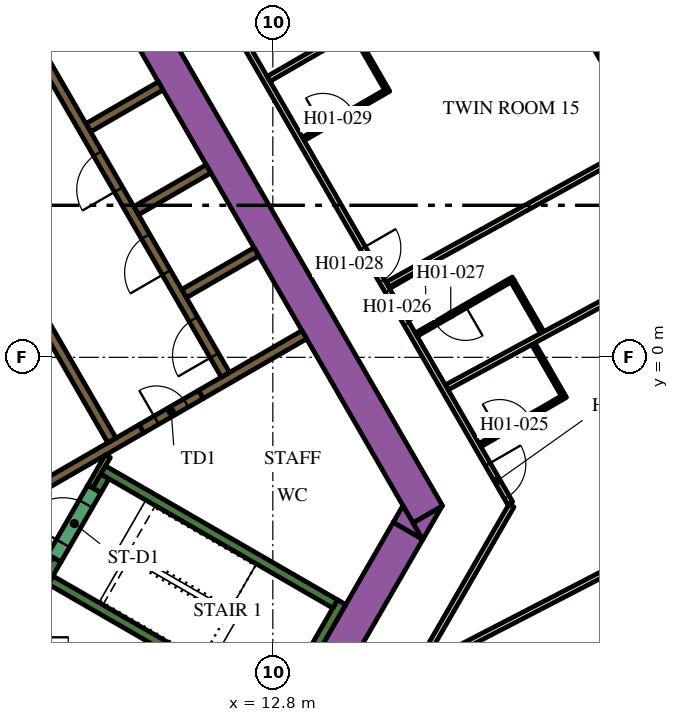
"""IFC4 building model, lengths in metres.
Left out: names, types, materials, properties, quantities, classifications, styles, units other than length and angle.
Written with IfcOpenShell. Run it as: python <this file> out.ifc"""

import sys

from ifc_helpers import new_model, si_unit, direction, frame, frame_2d, origin, origin_2d, place, context, subcontext, project, spatial, polyline, rectangle, outline, extrude, element, fill, save


model = new_model("IFC4")
c1 = context("Model", 3, precision=1e-05, world=origin(), true_north=direction((0.0, 1.0)))
c2 = subcontext(c1, "Body", "Model", "MODEL_VIEW")
j1 = project(units=[si_unit("LENGTHUNIT", "METRE"), si_unit("PLANEANGLEUNIT", "RADIAN")], contexts=[c1])
p1 = place(None, origin())
s1 = spatial("IfcSite", under=j1, at=p1, CompositionType="ELEMENT")
p2 = place(p1, origin())
s2 = spatial("IfcBuilding", under=s1, at=p2, CompositionType="ELEMENT")
p3 = place(p2, frame((0.0, 0.0, 35.4)))
s3 = spatial("IfcBuildingStorey", under=s2, at=p3, CompositionType="ELEMENT", Elevation=35.4)
p4 = place(p3, frame((21.443, 8.685, 0.0), z_axis=(0.0, 0.0, 1.0), x_axis=(-0.491973853463, 0.870609974391, 0.0)))
e1 = element("IfcColumn", 1, at=p4, inside=s3, PredefinedType="COLUMN", context=c2, shape_type="SweptSolid", body=[
    extrude(rectangle(XDim=1.4, YDim=0.9, at=origin_2d()), origin(), (0.0, 0.0, 1.0), 3.9),
])
p5 = place(p3, frame((6.711, 13.476, 0.0), z_axis=(0.0, 0.0, 1.0), x_axis=(0.500002723396, -0.866023831425, 0.0)))
e2 = element("IfcWall", 2, at=p5, inside=s3, PredefinedType="SOLIDWALL", context=c2, shape_type="SweptSolid", body=[
    extrude(rectangle(XDim=20.334, YDim=0.9, at=frame_2d((10.167, 0.0))), origin(), (0.0, 0.0, 1.0), 3.9),
])
p6 = place(p3, origin())
e3 = element("IfcWall", 3, at=p6, inside=s3, PredefinedType="SOLIDWALL", context=c2, shape_type="SweptSolid", body=[
    extrude(outline(polyline([(16.743, -4.8), (16.489, -4.36), (17.251, -3.92), (16.743, -4.8)])), origin(), (0.0, 0.0, 1.0), 3.9),
])
p7 = place(p3, frame((11.695, -12.644, 0.0), z_axis=(0.0, 0.0, 1.0), x_axis=(0.500010229568, 0.86601949766, 0.0)))
e4 = element("IfcWall", 4, at=p7, inside=s3, PredefinedType="SOLIDWALL", context=c2, shape_type="SweptSolid", body=[
    extrude(rectangle(XDim=9.326, YDim=0.9, at=frame_2d((4.663, 0.0))), origin(), (0.0, 0.0, 1.0), 3.9),
])
e5 = element("IfcWall", 5, at=p6, inside=s3, PredefinedType="SOLIDWALL", context=c2, shape_type="SweptSolid", body=[
    extrude(outline(polyline([(16.223, -3.9), (16.732, -4.78), (15.969, -4.34), (16.223, -3.9)])), origin(), (0.0, 0.0, 1.0), 3.9),
])
p8 = place(p3, frame((12.885, -9.431, 0.0), z_axis=(0.0, 0.0, 1.0), x_axis=(0.500020560727, 0.866013532718, 0.0)))
e6 = element("IfcWall", 6, at=p8, inside=s3, PredefinedType="SOLIDWALL", context=c2, shape_type="SweptSolid", body=[
    extrude(rectangle(XDim=3.45, YDim=0.25, at=frame_2d((1.725, 0.0))), origin(), (0.0, 0.0, 1.0), 3.9),
])
p9 = place(p3, frame((12.84, -9.261, 0.0), z_axis=(0.0, 0.0, 1.0), x_axis=(-0.866013990052, 0.500019768644, 0.0)))
e7 = element("IfcWall", 7, at=p9, inside=s3, PredefinedType="SOLIDWALL", context=c2, shape_type="SweptSolid", body=[
    extrude(rectangle(XDim=6.8, YDim=0.25, at=frame_2d((3.4, 0.0))), origin(), (0.0, 0.0, 1.0), 3.9),
])
p10 = place(p3, frame((6.78, -5.906, 0.0), z_axis=(0.0, 0.0, 1.0), x_axis=(0.500223362819, 0.865896406789, 0.0)))
e8 = element("IfcWall", 8, at=p10, inside=s3, PredefinedType="SOLIDWALL", context=c2, shape_type="SweptSolid", body=[
    extrude(rectangle(XDim=0.675, YDim=0.25, at=frame_2d((0.337, 0.0))), origin(), (0.0, 0.0, 1.0), 3.9),
])
p11 = place(p3, frame((8.334, -2.964, 0.0), z_axis=(0.0, 0.0, 1.0), x_axis=(0.866016039709, -0.500016218704, 0.0)))
e9 = element("IfcWall", 9, at=p11, inside=s3, PredefinedType="SOLIDWALL", context=c2, shape_type="SweptSolid", body=[
    extrude(rectangle(XDim=7.05, YDim=0.25, at=frame_2d((3.525, 0.0))), origin(), (0.0, 0.0, 1.0), 3.9),
])
p12 = place(p3, frame((8.168, -3.503, 0.0), z_axis=(0.0, 0.0, 1.0), x_axis=(0.49972245349, 0.866185586049, 0.0)))
e10 = element("IfcWall", 10, at=p12, inside=s3, PredefinedType="SOLIDWALL", context=c2, shape_type="SweptSolid", body=[
    extrude(rectangle(XDim=0.425, YDim=0.25, at=frame_2d((0.212, 0.0))), origin(), (0.0, 0.0, 1.0), 3.9),
])
p13 = place(p3, frame((10.464, 1.677, 0.0), z_axis=(0.0, 0.0, 1.0), x_axis=(0.86605622881, 0.499946605688, 0.0)))
e11 = element("IfcWall", 11, at=p13, inside=s3, PredefinedType="SOLIDWALL", context=c2, shape_type="SweptSolid", body=[
    extrude(rectangle(XDim=2.2, YDim=0.25, at=frame_2d((1.1, 0.0))), origin(), (0.0, 0.0, 1.0), 3.9),
])
p14 = place(p3, frame((13.629, 0.594, 0.0), z_axis=(0.0, 0.0, 1.0), x_axis=(-0.86602790099, -0.499995674689, 0.0)))
e12 = element("IfcWall", 12, at=p14, inside=s3, PredefinedType="SOLIDWALL", context=c2, shape_type="SweptSolid", body=[
    extrude(rectangle(XDim=3.146, YDim=0.25, at=frame_2d((1.573, 0.0))), origin(), (0.0, 0.0, 1.0), 3.9),
])
p15 = place(p3, frame((6.614, -3.456, 0.0), z_axis=(0.0, 0.0, 1.0), x_axis=(0.86602447079, 0.500001615989, 0.0)))
e13 = element("IfcWall", 13, at=p15, inside=s3, PredefinedType="SOLIDWALL", context=c2, shape_type="SweptSolid", body=[
    extrude(rectangle(XDim=3.154, YDim=0.25, at=frame_2d((1.577, 0.0))), origin(), (0.0, 0.0, 1.0), 3.9),
])
for number, where, z_axis, x_axis in (
    (14, (7.944, 6.041, 0.0), (0.0, 0.0, 1.0), (0.866, 0.5, 0.0)),
    (15, (9.204, 3.859, 0.0), (0.0, 0.0, 1.0), (0.866, 0.5, 0.0)),
):
    element("IfcWall", number, at=place(p3, frame(where, z_axis=z_axis, x_axis=x_axis)), inside=s3, PredefinedType="SOLIDWALL", context=c2, shape_type="SweptSolid", body=[
        extrude(rectangle(XDim=2.2, YDim=0.25, at=frame_2d((1.1, 0.0))), origin(), (0.0, 0.0, 1.0), 3.9),
    ])
p16 = place(p3, frame((6.945, -5.222, 0.0), z_axis=(0.0, 0.0, 1.0), x_axis=(-0.499818422106, -0.866130212453, 0.0)))
e16 = element("IfcWall", 16, at=p16, inside=s3, PredefinedType="PARTITIONING", context=c2, shape_type="SweptSolid", body=[
    extrude(rectangle(XDim=0.514, YDim=0.15, at=frame_2d((0.257, 0.0))), origin(), (0.0, 0.0, 1.0), 2.75),
])
p17 = place(p3, frame((8.459, -2.599, 0.0), z_axis=(0.0, 0.0, 1.0), x_axis=(-0.500041054325, -0.866001699761, 0.0)))
e17 = element("IfcWall", 17, at=p17, inside=s3, PredefinedType="PARTITIONING", context=c2, shape_type="SweptSolid", body=[
    extrude(rectangle(XDim=0.929, YDim=0.15, at=frame_2d((0.464, 0.0))), origin(), (0.0, 0.0, 1.0), 3.9),
])
p18 = place(p3, frame((11.553, -0.46, 0.0), z_axis=(0.0, 0.0, 1.0), x_axis=(-0.500006514828, 0.866021642414, 0.0)))
e18 = element("IfcWall", 18, at=p18, inside=s3, PredefinedType="SOLIDWALL", context=c2, shape_type="SweptSolid", body=[
    extrude(rectangle(XDim=12.35, YDim=0.25, at=frame_2d((6.175, 0.0))), origin(), (0.0, 0.0, 1.0), 3.9),
])
p19 = place(p18, frame((0.585, 0.0, 0.0)))
e19 = element("IfcOpeningElement", 19, at=p19, cuts=e18, PredefinedType="OPENING", context=c2, shape_type="SweptSolid", body=[
    extrude(rectangle(XDim=1.1, YDim=2.1, at=frame_2d((0.55, 1.05))), frame((0.0, 0.135, 0.0), z_axis=(0.0, -1.0, 0.0), x_axis=(1.0, 0.0, 0.0)), (0.0, 0.0, 1.0), 0.27),
])
p20 = place(p18, frame((3.105, 0.0, 0.0)))
e20 = element("IfcOpeningElement", 20, at=p20, cuts=e18, PredefinedType="OPENING", context=c2, shape_type="SweptSolid", body=[
    extrude(rectangle(XDim=1.1, YDim=2.1, at=frame_2d((0.55, 1.05))), frame((0.0, 0.135, 0.0), z_axis=(0.0, -1.0, 0.0), x_axis=(1.0, 0.0, 0.0)), (0.0, 0.0, 1.0), 0.27),
])
p21 = place(p18, frame((5.625, 0.0, 0.0)))
e21 = element("IfcOpeningElement", 21, at=p21, cuts=e18, PredefinedType="OPENING", context=c2, shape_type="SweptSolid", body=[
    extrude(rectangle(XDim=1.1, YDim=2.1, at=frame_2d((0.55, 1.05))), frame((0.0, 0.135, 0.0), z_axis=(0.0, -1.0, 0.0), x_axis=(1.0, 0.0, 0.0)), (0.0, 0.0, 1.0), 0.27),
])
p22 = place(p3, frame((8.565, -2.185, 0.0), z_axis=(0.0, 0.0, 1.0), x_axis=(-0.499997954832, 0.866026584559, 0.0)))
e22 = element("IfcWall", 22, at=p22, inside=s3, PredefinedType="SOLIDWALL", context=c2, shape_type="SweptSolid", body=[
    extrude(rectangle(XDim=12.35, YDim=0.25, at=frame_2d((6.175, 0.0))), origin(), (0.0, 0.0, 1.0), 3.9),
])
p23 = place(p22, frame((5.725, 0.0, 0.0)))
e23 = element("IfcOpeningElement", 23, at=p23, cuts=e22, PredefinedType="OPENING", context=c2, shape_type="SweptSolid", body=[
    extrude(rectangle(XDim=0.9, YDim=2.1, at=frame_2d((0.45, 1.05))), frame((0.0, 0.135, 0.0), z_axis=(0.0, -1.0, 0.0), x_axis=(1.0, 0.0, 0.0)), (0.0, 0.0, 1.0), 0.27),
])
p24 = place(p3, frame((7.053, -5.284, 0.0), z_axis=(0.0, 0.0, 1.0), x_axis=(0.500078061341, 0.865980330357, 0.0)))
e24 = element("IfcWall", 24, at=p24, inside=s3, PredefinedType="SOLIDWALL", context=c2, shape_type="SweptSolid", body=[
    extrude(rectangle(XDim=2.1, YDim=0.4, at=frame_2d((1.05, 0.0))), origin(), (0.0, 0.0, 1.0), 3.9),
])
p25 = place(p24, frame((0.45, 0.0, 0.0)))
e25 = element("IfcOpeningElement", 25, at=p25, cuts=e24, PredefinedType="OPENING", context=c2, shape_type="SweptSolid", body=[
    extrude(rectangle(XDim=1.2, YDim=2.1, at=frame_2d((0.6, 1.05))), frame((0.0, 0.21, 0.0), z_axis=(0.0, -1.0, 0.0), x_axis=(1.0, 0.0, 0.0)), (0.0, 0.0, 1.0), 0.42),
])
p26 = place(p3, frame((9.346, -1.879, 0.0), z_axis=(0.0, 0.0, 1.0), x_axis=(0.866047807691, 0.499961193289, 0.0)))
e26 = element("IfcWall", 26, at=p26, inside=s3, PredefinedType="SOLIDWALL", context=c2, shape_type="SweptSolid", body=[
    extrude(rectangle(XDim=1.8, YDim=0.25, at=frame_2d((0.9, 0.0))), origin(), (0.0, 0.0, 1.0), 3.9),
])
p27 = place(p26, frame((0.45, 0.0, 0.0)))
e27 = element("IfcOpeningElement", 27, at=p27, cuts=e26, PredefinedType="OPENING", context=c2, shape_type="SweptSolid", body=[
    extrude(rectangle(XDim=0.9, YDim=2.1, at=frame_2d((0.45, 1.05))), frame((0.0, 0.135, 0.0), z_axis=(0.0, -1.0, 0.0), x_axis=(1.0, 0.0, 0.0)), (0.0, 0.0, 1.0), 0.27),
])
p28 = place(p3, frame((19.081, -3.9, 0.0), z_axis=(0.0, 0.0, 1.0), x_axis=(-0.499974327079, -0.866040225545, 0.0)))
e28 = element("IfcWall", 28, at=p28, inside=s3, PredefinedType="PARTITIONING", context=c2, shape_type="SweptSolid", body=[
    extrude(rectangle(XDim=5.258, YDim=0.15, at=frame_2d((2.629, 0.0))), origin(), (0.0, 0.0, 1.0), 2.75),
])
p29 = place(p3, frame((6.163, 18.475, 0.0), z_axis=(0.0, 0.0, 1.0), x_axis=(0.500001317485, -0.866024643133, 0.0)))
e29 = element("IfcWall", 29, at=p29, inside=s3, PredefinedType="PARTITIONING", context=c2, shape_type="SweptSolid", body=[
    extrude(rectangle(XDim=25.767, YDim=0.15, at=frame_2d((12.883, 0.0))), origin(), (0.0, 0.0, 1.0), 2.75),
])
p30 = place(p29, frame((24.586, 0.0, 0.0)))
e30 = element("IfcOpeningElement", 30, at=p30, cuts=e29, PredefinedType="OPENING", context=c2, shape_type="SweptSolid", body=[
    extrude(rectangle(XDim=1.0, YDim=2.1, at=frame_2d((0.5, 1.05))), frame((0.0, 0.085, 0.0), z_axis=(0.0, -1.0, 0.0), x_axis=(1.0, 0.0, 0.0)), (0.0, 0.0, 1.0), 0.17),
])
p31 = place(p29, frame((19.319, 0.0, 0.0)))
e31 = element("IfcOpeningElement", 31, at=p31, cuts=e29, PredefinedType="OPENING", context=c2, shape_type="SweptSolid", body=[
    extrude(rectangle(XDim=1.0, YDim=2.1, at=frame_2d((0.5, 1.05))), frame((0.0, 0.085, 0.0), z_axis=(0.0, -1.0, 0.0), x_axis=(1.0, 0.0, 0.0)), (0.0, 0.0, 1.0), 0.17),
])
p32 = place(p29, frame((18.012, 0.0, 0.0)))
e32 = element("IfcOpeningElement", 32, at=p32, cuts=e29, PredefinedType="OPENING", context=c2, shape_type="SweptSolid", body=[
    extrude(rectangle(XDim=1.0, YDim=2.1, at=frame_2d((0.5, 1.05))), frame((0.0, 0.085, 0.0), z_axis=(0.0, -1.0, 0.0), x_axis=(1.0, 0.0, 0.0)), (0.0, 0.0, 1.0), 0.17),
])
p33 = place(p29, frame((6.824, 0.0, 0.0)))
e33 = element("IfcOpeningElement", 33, at=p33, cuts=e29, PredefinedType="OPENING", context=c2, shape_type="SweptSolid", body=[
    extrude(rectangle(XDim=1.1, YDim=2.1, at=frame_2d((0.55, 1.05))), frame((0.0, 0.085, 0.0), z_axis=(0.0, -1.0, 0.0), x_axis=(1.0, 0.0, 0.0)), (0.0, 0.0, 1.0), 0.17),
])
p34 = place(p29, frame((4.658, 0.0, 0.0)))
e34 = element("IfcOpeningElement", 34, at=p34, cuts=e29, PredefinedType="OPENING", context=c2, shape_type="SweptSolid", body=[
    extrude(rectangle(XDim=0.9, YDim=2.1, at=frame_2d((0.45, 1.05))), frame((0.0, 0.085, 0.0), z_axis=(0.0, -1.0, 0.0), x_axis=(1.0, 0.0, 0.0)), (0.0, 0.0, 1.0), 0.17),
])
p35 = place(p29, frame((0.18, 0.0, 0.0)))
e35 = element("IfcOpeningElement", 35, at=p35, cuts=e29, PredefinedType="OPENING", context=c2, shape_type="SweptSolid", body=[
    extrude(rectangle(XDim=1.0, YDim=2.1, at=frame_2d((0.5, 1.05))), frame((0.0, 0.085, 0.0), z_axis=(0.0, -1.0, 0.0), x_axis=(1.0, 0.0, 0.0)), (0.0, 0.0, 1.0), 0.17),
])
p36 = place(p3, frame((19.982, 11.537, 0.0), z_axis=(0.0, 0.0, 1.0), x_axis=(-0.866020994654, -0.500007636761, 0.0)))
e36 = element("IfcWall", 36, at=p36, inside=s3, PredefinedType="PARTITIONING", context=c2, shape_type="SweptSolid", body=[
    extrude(rectangle(XDim=8.423, YDim=0.15, at=frame_2d((4.211, 0.0))), origin(), (0.0, 0.0, 1.0), 2.75),
])
p37 = place(p3, frame((23.132, 5.962, 0.0), z_axis=(0.0, 0.0, 1.0), x_axis=(-0.875121716713, -0.483902863121, 0.0)))
e37 = element("IfcWall", 37, at=p37, inside=s3, PredefinedType="PARTITIONING", context=c2, shape_type="SweptSolid", body=[
    extrude(rectangle(XDim=8.355, YDim=0.15, at=frame_2d((4.178, 0.0))), origin(), (0.0, 0.0, 1.0), 2.75),
])
p38 = place(p3, frame((27.134, -2.779, 0.0), z_axis=(0.0, 0.0, 1.0), x_axis=(-0.8882049501, -0.459447457951, 0.0)))
e38 = element("IfcWall", 38, at=p38, inside=s3, PredefinedType="PARTITIONING", context=c2, shape_type="SweptSolid", body=[
    extrude(rectangle(XDim=11.638, YDim=0.15, at=frame_2d((5.819, 0.0))), origin(), (0.0, 0.0, 1.0), 2.75),
])
p39 = place(p3, frame((24.145, 2.871, 0.0), z_axis=(0.0, 0.0, 1.0), x_axis=(-0.879551725039, -0.475803281809, 0.0)))
e39 = element("IfcWall", 39, at=p39, inside=s3, PredefinedType="PARTITIONING", context=c2, shape_type="SweptSolid", body=[
    extrude(rectangle(XDim=7.688, YDim=0.15, at=frame_2d((3.844, 0.0))), origin(), (0.0, 0.0, 1.0), 2.75),
])
p40 = place(p3, frame((18.25, -2.311, 0.0), z_axis=(0.0, 0.0, 1.0), x_axis=(0.866021400173, 0.500006934395, 0.0)))
e40 = element("IfcWall", 40, at=p40, inside=s3, PredefinedType="PARTITIONING", context=c2, shape_type="SweptSolid", body=[
    extrude(rectangle(XDim=2.6, YDim=0.1, at=frame_2d((1.3, 0.0))), origin(), (0.0, 0.0, 1.0), 2.75),
])
p41 = place(p40, frame((0.6, 0.0, 0.0)))
e41 = element("IfcOpeningElement", 41, at=p41, cuts=e40, PredefinedType="OPENING", context=c2, shape_type="SweptSolid", body=[
    extrude(rectangle(XDim=0.9, YDim=2.1, at=frame_2d((0.45, 1.05))), frame((0.0, 0.06, 0.0), z_axis=(0.0, -1.0, 0.0), x_axis=(1.0, 0.0, 0.0)), (0.0, 0.0, 1.0), 0.12),
])
p42 = place(p3, frame((20.434, -0.993, 0.0), z_axis=(0.0, 0.0, 1.0), x_axis=(-0.500086022567, 0.865975732936, 0.0)))
e42 = element("IfcWall", 42, at=p42, inside=s3, PredefinedType="PARTITIONING", context=c2, shape_type="SweptSolid", body=[
    extrude(rectangle(XDim=1.55, YDim=0.1, at=frame_2d((0.775, 0.0))), origin(), (0.0, 0.0, 1.0), 2.75),
])
p43 = place(p3, frame((19.127, 2.071, 0.0), z_axis=(0.0, 0.0, 1.0), x_axis=(-0.866003658127, -0.500037662692, 0.0)))
e43 = element("IfcWall", 43, at=p43, inside=s3, PredefinedType="PARTITIONING", context=c2, shape_type="SweptSolid", body=[
    extrude(rectangle(XDim=2.95, YDim=0.1, at=frame_2d((1.475, 0.0))), origin(), (0.0, 0.0, 1.0), 2.75),
])
p44 = place(p43, frame((1.45, 0.0, 0.0)))
e44 = element("IfcOpeningElement", 44, at=p44, cuts=e43, PredefinedType="OPENING", context=c2, shape_type="SweptSolid", body=[
    extrude(rectangle(XDim=0.9, YDim=2.1, at=frame_2d((0.45, 1.05))), frame((0.0, 0.06, 0.0), z_axis=(0.0, -1.0, 0.0), x_axis=(1.0, 0.0, 0.0)), (0.0, 0.0, 1.0), 0.12),
])
p45 = place(p3, frame((19.109, 2.002, 0.0), z_axis=(0.0, 0.0, 1.0), x_axis=(0.500086022567, -0.865975732936, 0.0)))
e45 = element("IfcWall", 45, at=p45, inside=s3, PredefinedType="PARTITIONING", context=c2, shape_type="SweptSolid", body=[
    extrude(rectangle(XDim=1.55, YDim=0.1, at=frame_2d((0.775, 0.0))), origin(), (0.0, 0.0, 1.0), 2.75),
])
p46 = place(p3, frame((13.6, 5.744, 0.0), z_axis=(0.0, 0.0, 1.0), x_axis=(0.866021400173, 0.500006934395, 0.0)))
e46 = element("IfcWall", 46, at=p46, inside=s3, PredefinedType="PARTITIONING", context=c2, shape_type="SweptSolid", body=[
    extrude(rectangle(XDim=2.6, YDim=0.1, at=frame_2d((1.3, 0.0))), origin(), (0.0, 0.0, 1.0), 2.75),
])
p47 = place(p46, frame((0.6, 0.0, 0.0)))
e47 = element("IfcOpeningElement", 47, at=p47, cuts=e46, PredefinedType="OPENING", context=c2, shape_type="SweptSolid", body=[
    extrude(rectangle(XDim=0.9, YDim=2.1, at=frame_2d((0.45, 1.05))), frame((0.0, 0.06, 0.0), z_axis=(0.0, -1.0, 0.0), x_axis=(1.0, 0.0, 0.0)), (0.0, 0.0, 1.0), 0.12),
])
p48 = place(p3, frame((15.779, 7.071, 0.0), z_axis=(0.0, 0.0, 1.0), x_axis=(-0.499976720371, 0.866038843867, 0.0)))
e48 = element("IfcWall", 48, at=p48, inside=s3, PredefinedType="PARTITIONING", context=c2, shape_type="SweptSolid", body=[
    extrude(rectangle(XDim=1.69, YDim=0.1, at=frame_2d((0.845, 0.0))), origin(), (0.0, 0.0, 1.0), 2.75),
])
p49 = place(p19, origin())
e49 = element("IfcDoor", 49, at=p49, inside=s3, OperationType="DOUBLE_DOOR_SLIDING", PredefinedType="DOOR", context=c2, shape_type="SweptSolid", body=[
    extrude(rectangle(XDim=1.1, YDim=2.1, at=frame_2d((0.55, 1.05))), frame((0.0, 0.025, 0.0), z_axis=(0.0, -1.0, 0.0), x_axis=(1.0, 0.0, 0.0)), (0.0, 0.0, 1.0), 0.05),
])
fill(e19, e49)
p50 = place(p20, origin())
e50 = element("IfcDoor", 50, at=p50, inside=s3, OperationType="DOUBLE_DOOR_SLIDING", PredefinedType="DOOR", context=c2, shape_type="SweptSolid", body=[
    extrude(rectangle(XDim=1.1, YDim=2.1, at=frame_2d((0.55, 1.05))), frame((0.0, 0.025, 0.0), z_axis=(0.0, -1.0, 0.0), x_axis=(1.0, 0.0, 0.0)), (0.0, 0.0, 1.0), 0.05),
])
fill(e20, e50)
p51 = place(p21, origin())
e51 = element("IfcDoor", 51, at=p51, inside=s3, OperationType="DOUBLE_DOOR_SLIDING", PredefinedType="DOOR", context=c2, shape_type="SweptSolid", body=[
    extrude(rectangle(XDim=1.1, YDim=2.1, at=frame_2d((0.55, 1.05))), frame((0.0, 0.025, 0.0), z_axis=(0.0, -1.0, 0.0), x_axis=(1.0, 0.0, 0.0)), (0.0, 0.0, 1.0), 0.05),
])
fill(e21, e51)
p52 = place(p25, origin())
e52 = element("IfcDoor", 52, at=p52, inside=s3, OperationType="SINGLE_SWING_LEFT", PredefinedType="DOOR", context=c2, shape_type="SweptSolid", body=[
    extrude(rectangle(XDim=1.2, YDim=2.1, at=frame_2d((0.6, 1.05))), frame((0.0, 0.025, 0.0), z_axis=(0.0, -1.0, 0.0), x_axis=(1.0, 0.0, 0.0)), (0.0, 0.0, 1.0), 0.05),
])
fill(e25, e52)
p53 = place(p27, origin())
e53 = element("IfcDoor", 53, at=p53, inside=s3, OperationType="SINGLE_SWING_LEFT", PredefinedType="DOOR", context=c2, shape_type="SweptSolid", body=[
    extrude(rectangle(XDim=0.9, YDim=2.1, at=frame_2d((0.45, 1.05))), frame((0.0, 0.025, 0.0), z_axis=(0.0, -1.0, 0.0), x_axis=(1.0, 0.0, 0.0)), (0.0, 0.0, 1.0), 0.05),
])
fill(e27, e53)
p54 = place(p30, origin())
e54 = element("IfcDoor", 54, at=p54, inside=s3, OperationType="SINGLE_SWING_RIGHT", PredefinedType="DOOR", context=c2, shape_type="SweptSolid", body=[
    extrude(rectangle(XDim=1.0, YDim=2.1, at=frame_2d((0.5, 1.05))), frame((0.0, 0.025, 0.0), z_axis=(0.0, -1.0, 0.0), x_axis=(1.0, 0.0, 0.0)), (0.0, 0.0, 1.0), 0.05),
])
fill(e30, e54)
p55 = place(p41, origin())
e55 = element("IfcDoor", 55, at=p55, inside=s3, OperationType="SINGLE_SWING_LEFT", PredefinedType="DOOR", context=c2, shape_type="SweptSolid", body=[
    extrude(rectangle(XDim=0.9, YDim=2.1, at=frame_2d((0.45, 1.05))), frame((0.0, 0.025, 0.0), z_axis=(0.0, -1.0, 0.0), x_axis=(1.0, 0.0, 0.0)), (0.0, 0.0, 1.0), 0.05),
])
fill(e41, e55)
p56 = place(p31, origin())
e56 = element("IfcDoor", 56, at=p56, inside=s3, OperationType="SINGLE_SWING_LEFT", PredefinedType="DOOR", context=c2, shape_type="SweptSolid", body=[
    extrude(rectangle(XDim=1.0, YDim=2.1, at=frame_2d((0.5, 1.05))), frame((0.0, 0.025, 0.0), z_axis=(0.0, -1.0, 0.0), x_axis=(1.0, 0.0, 0.0)), (0.0, 0.0, 1.0), 0.05),
])
fill(e31, e56)
p57 = place(p44, origin())
e57 = element("IfcDoor", 57, at=p57, inside=s3, OperationType="SINGLE_SWING_LEFT", PredefinedType="DOOR", context=c2, shape_type="SweptSolid", body=[
    extrude(rectangle(XDim=0.9, YDim=2.1, at=frame_2d((0.45, 1.05))), frame((0.0, 0.025, 0.0), z_axis=(0.0, -1.0, 0.0), x_axis=(1.0, 0.0, 0.0)), (0.0, 0.0, 1.0), 0.05),
])
fill(e44, e57)
p58 = place(p32, origin())
e58 = element("IfcDoor", 58, at=p58, inside=s3, OperationType="SINGLE_SWING_RIGHT", PredefinedType="DOOR", context=c2, shape_type="SweptSolid", body=[
    extrude(rectangle(XDim=1.0, YDim=2.1, at=frame_2d((0.5, 1.05))), frame((0.0, 0.025, 0.0), z_axis=(0.0, -1.0, 0.0), x_axis=(1.0, 0.0, 0.0)), (0.0, 0.0, 1.0), 0.05),
])
fill(e32, e58)
p59 = place(p47, origin())
e59 = element("IfcDoor", 59, at=p59, inside=s3, OperationType="SINGLE_SWING_RIGHT", PredefinedType="DOOR", context=c2, shape_type="SweptSolid", body=[
    extrude(rectangle(XDim=0.9, YDim=2.1, at=frame_2d((0.45, 1.05))), frame((0.0, 0.025, 0.0), z_axis=(0.0, -1.0, 0.0), x_axis=(1.0, 0.0, 0.0)), (0.0, 0.0, 1.0), 0.05),
])
fill(e47, e59)
save(model, sys.argv[1])
